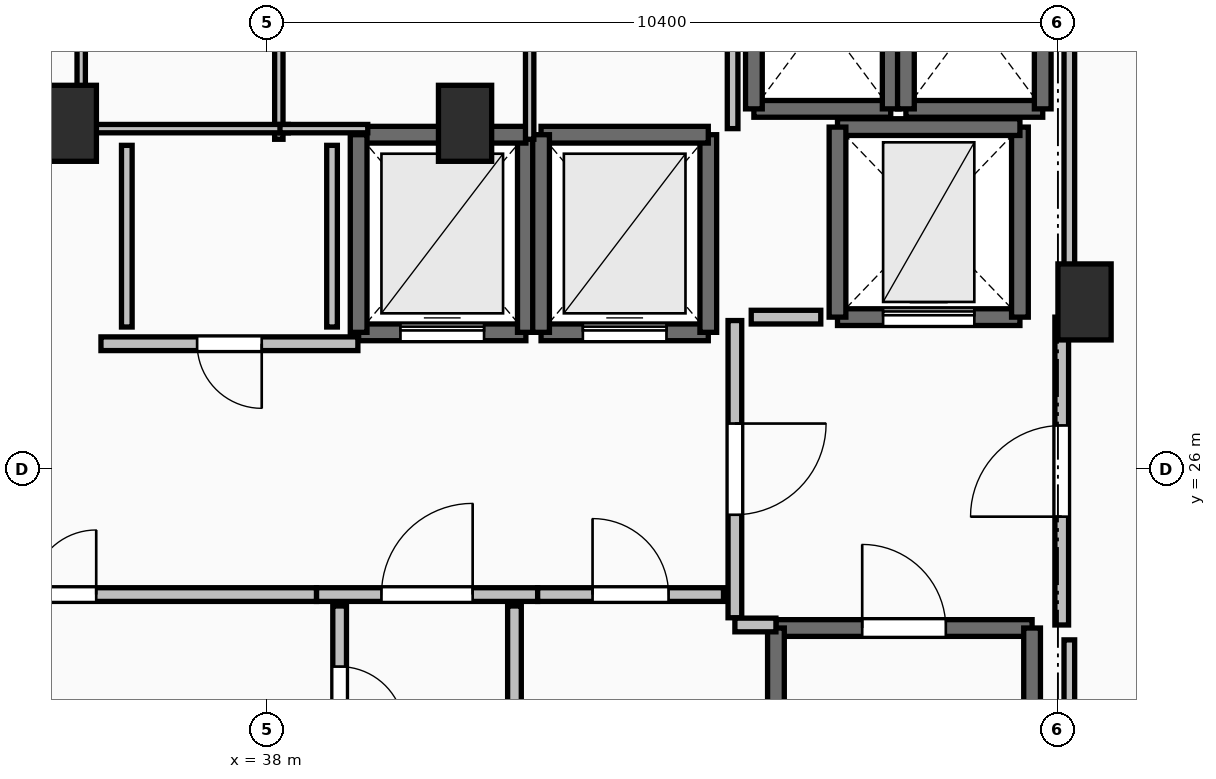
"""IFC4 building model, lengths in metres.
Left out: names, types, materials, properties, quantities, classifications, styles, units other than length and angle.
Written with IfcOpenShell. Run it as: python <this file> out.ifc"""

import sys

from ifc_helpers import new_model, si_unit, direction, frame, frame_2d, origin, origin_2d, place, context, subcontext, project, spatial, rectangle, extrude, element, fill, save


model = new_model("IFC4")
c1 = context("Model", 3, precision=1e-05, world=origin(), true_north=direction((0.0, 1.0)))
c2 = subcontext(c1, "Body", "Model", "MODEL_VIEW")
j1 = project(units=[si_unit("LENGTHUNIT", "METRE"), si_unit("PLANEANGLEUNIT", "RADIAN")], contexts=[c1])
p1 = place(None, origin())
s1 = spatial("IfcSite", under=j1, at=p1, CompositionType="ELEMENT")
p2 = place(p1, origin())
s2 = spatial("IfcBuilding", under=s1, at=p2, CompositionType="ELEMENT")
p3 = place(p2, frame((0.0, 0.0, 244.9)))
s3 = spatial("IfcBuildingStorey", under=s2, at=p3, CompositionType="ELEMENT", Elevation=244.9)
for number, where, z_axis, x_axis in (
    (1, (48.75, 28.2, 0.0), (0.0, 0.0, 1.0), (1.0, 0.0, 0.0)),
    (2, (35.4, 30.55, 0.0), (0.0, 0.0, 1.0), (1.0, 0.0, 0.0)),
    (3, (40.6, 30.55, 0.0), (0.0, 0.0, 1.0), (1.0, 0.0, 0.0)),
):
    element("IfcColumn", number, at=place(p3, frame(where, z_axis=z_axis, x_axis=x_axis)), inside=s3, PredefinedType="PILASTER", context=c2, shape_type="SweptSolid", body=[
        extrude(rectangle(XDim=0.7, YDim=1.0, at=origin_2d()), origin(), (0.0, 0.0, 1.0), 3.55),
    ])
p4 = place(p3, frame((44.69, 23.91, 0.0), z_axis=(0.0, 0.0, 1.0), x_axis=(1.0, 0.0, 0.0)))
e4 = element("IfcWall", 4, at=p4, inside=s3, PredefinedType="SOLIDWALL", context=c2, shape_type="SweptSolid", body=[
    extrude(rectangle(XDim=3.37, YDim=0.22, at=frame_2d((1.685, 0.0))), origin(), (0.0, 0.0, 1.0), 3.29),
])
p5 = place(p4, frame((1.135, 0.0, 0.0)))
e5 = element("IfcOpeningElement", 5, at=p5, cuts=e4, PredefinedType="OPENING", context=c2, shape_type="SweptSolid", body=[
    extrude(rectangle(XDim=1.1, YDim=2.15, at=frame_2d((0.55, 1.075))), frame((0.0, 0.125, 0.0), z_axis=(0.0, -1.0, 0.0), x_axis=(1.0, 0.0, 0.0)), (0.0, 0.0, 1.0), 0.25),
])
for number, where, z_axis, x_axis in (
    (6, (48.06, 23.91, 0.0), (0.0, 0.0, 1.0), (0.0, -1.0, 0.0)),
    (7, (44.69, 16.49, 0.0), (0.0, 0.0, 1.0), (0.0, 1.0, 0.0)),
):
    element("IfcWall", number, at=place(p3, frame(where, z_axis=z_axis, x_axis=x_axis)), inside=s3, PredefinedType="SOLIDWALL", context=c2, shape_type="SweptSolid", body=[
        extrude(rectangle(XDim=7.42, YDim=0.22, at=frame_2d((3.71, 0.0))), origin(), (0.0, 0.0, 1.0), 3.29),
    ])
p6 = place(p3, frame((39.2, 27.8, 0.0), z_axis=(0.0, 0.0, 1.0), x_axis=(1.0, 0.0, 0.0)))
e8 = element("IfcWall", 8, at=p6, inside=s3, PredefinedType="SOLIDWALL", context=c2, shape_type="SweptSolid", body=[
    extrude(rectangle(XDim=2.2, YDim=0.22, at=frame_2d((1.1, 0.0))), origin(), (0.0, 0.0, 1.0), 3.29),
])
p7 = place(p6, frame((0.55, 0.0, 0.0)))
e9 = element("IfcOpeningElement", 9, at=p7, cuts=e8, PredefinedType="OPENING", context=c2, shape_type="SweptSolid", body=[
    extrude(rectangle(XDim=1.1, YDim=2.2, at=frame_2d((0.55, 1.1))), frame((0.0, 0.125, 0.0), z_axis=(0.0, -1.0, 0.0), x_axis=(1.0, 0.0, 0.0)), (0.0, 0.0, 1.0), 0.25),
])
p8 = place(p3, frame((41.4, 27.8, 0.0), z_axis=(0.0, 0.0, 1.0), x_axis=(0.0, 1.0, 0.0)))
e10 = element("IfcWall", 10, at=p8, inside=s3, PredefinedType="SOLIDWALL", context=c2, shape_type="SweptSolid", body=[
    extrude(rectangle(XDim=2.6, YDim=0.22, at=frame_2d((1.3, 0.0))), origin(), (0.0, 0.0, 1.0), 3.29),
])
p9 = place(p3, frame((41.4, 30.4, 0.0), z_axis=(0.0, 0.0, 1.0), x_axis=(-1.0, 0.0, 0.0)))
e11 = element("IfcWall", 11, at=p9, inside=s3, PredefinedType="SOLIDWALL", context=c2, shape_type="SweptSolid", body=[
    extrude(rectangle(XDim=2.2, YDim=0.22, at=frame_2d((1.1, 0.0))), origin(), (0.0, 0.0, 1.0), 3.29),
])
p10 = place(p3, frame((39.2, 30.4, 0.0), z_axis=(0.0, 0.0, 1.0), x_axis=(0.0, -1.0, 0.0)))
e12 = element("IfcWall", 12, at=p10, inside=s3, PredefinedType="SOLIDWALL", context=c2, shape_type="SweptSolid", body=[
    extrude(rectangle(XDim=2.6, YDim=0.22, at=frame_2d((1.3, 0.0))), origin(), (0.0, 0.0, 1.0), 3.29),
])
p11 = place(p3, frame((41.6, 27.8, 0.0), z_axis=(0.0, 0.0, 1.0), x_axis=(1.0, 0.0, 0.0)))
e13 = element("IfcWall", 13, at=p11, inside=s3, PredefinedType="SOLIDWALL", context=c2, shape_type="SweptSolid", body=[
    extrude(rectangle(XDim=2.2, YDim=0.22, at=frame_2d((1.1, 0.0))), origin(), (0.0, 0.0, 1.0), 3.29),
])
p12 = place(p11, frame((0.55, 0.0, 0.0)))
e14 = element("IfcOpeningElement", 14, at=p12, cuts=e13, PredefinedType="OPENING", context=c2, shape_type="SweptSolid", body=[
    extrude(rectangle(XDim=1.1, YDim=2.2, at=frame_2d((0.55, 1.1))), frame((0.0, 0.125, 0.0), z_axis=(0.0, -1.0, 0.0), x_axis=(1.0, 0.0, 0.0)), (0.0, 0.0, 1.0), 0.25),
])
p13 = place(p3, frame((43.8, 27.8, 0.0), z_axis=(0.0, 0.0, 1.0), x_axis=(0.0, 1.0, 0.0)))
e15 = element("IfcWall", 15, at=p13, inside=s3, PredefinedType="SOLIDWALL", context=c2, shape_type="SweptSolid", body=[
    extrude(rectangle(XDim=2.6, YDim=0.22, at=frame_2d((1.3, 0.0))), origin(), (0.0, 0.0, 1.0), 3.29),
])
p14 = place(p3, frame((43.8, 30.4, 0.0), z_axis=(0.0, 0.0, 1.0), x_axis=(-1.0, 0.0, 0.0)))
e16 = element("IfcWall", 16, at=p14, inside=s3, PredefinedType="SOLIDWALL", context=c2, shape_type="SweptSolid", body=[
    extrude(rectangle(XDim=2.2, YDim=0.22, at=frame_2d((1.1, 0.0))), origin(), (0.0, 0.0, 1.0), 3.29),
])
p15 = place(p3, frame((41.6, 30.4, 0.0), z_axis=(0.0, 0.0, 1.0), x_axis=(0.0, -1.0, 0.0)))
e17 = element("IfcWall", 17, at=p15, inside=s3, PredefinedType="SOLIDWALL", context=c2, shape_type="SweptSolid", body=[
    extrude(rectangle(XDim=2.6, YDim=0.22, at=frame_2d((1.3, 0.0))), origin(), (0.0, 0.0, 1.0), 3.29),
])
p16 = place(p3, frame((44.4, 30.74, 0.0), z_axis=(0.0, 0.0, 1.0), x_axis=(1.0, 0.0, 0.0)))
e18 = element("IfcWall", 18, at=p16, inside=s3, PredefinedType="SOLIDWALL", context=c2, shape_type="SweptSolid", body=[
    extrude(rectangle(XDim=1.8, YDim=0.22, at=frame_2d((0.9, 0.0))), origin(), (0.0, 0.0, 1.0), 3.29),
])
for number, where, z_axis, x_axis in (
    (19, (46.2, 30.74, 0.0), (0.0, 0.0, 1.0), (0.0, 1.0, 0.0)),
    (20, (44.4, 33.16, 0.0), (0.0, 0.0, 1.0), (0.0, -1.0, 0.0)),
):
    element("IfcWall", number, at=place(p3, frame(where, z_axis=z_axis, x_axis=x_axis)), inside=s3, PredefinedType="SOLIDWALL", context=c2, shape_type="SweptSolid", body=[
        extrude(rectangle(XDim=2.42, YDim=0.22, at=frame_2d((1.21, 0.0))), origin(), (0.0, 0.0, 1.0), 3.29),
    ])
p17 = place(p3, frame((46.4, 30.74, 0.0), z_axis=(0.0, 0.0, 1.0), x_axis=(1.0, 0.0, 0.0)))
e21 = element("IfcWall", 21, at=p17, inside=s3, PredefinedType="SOLIDWALL", context=c2, shape_type="SweptSolid", body=[
    extrude(rectangle(XDim=1.8, YDim=0.22, at=frame_2d((0.9, 0.0))), origin(), (0.0, 0.0, 1.0), 3.29),
])
for number, where, z_axis, x_axis in (
    (22, (48.2, 30.74, 0.0), (0.0, 0.0, 1.0), (0.0, 1.0, 0.0)),
    (23, (46.4, 33.16, 0.0), (0.0, 0.0, 1.0), (0.0, -1.0, 0.0)),
):
    element("IfcWall", number, at=place(p3, frame(where, z_axis=z_axis, x_axis=x_axis)), inside=s3, PredefinedType="SOLIDWALL", context=c2, shape_type="SweptSolid", body=[
        extrude(rectangle(XDim=2.42, YDim=0.22, at=frame_2d((1.21, 0.0))), origin(), (0.0, 0.0, 1.0), 3.29),
    ])
p18 = place(p3, frame((45.5, 28.0, 0.0), z_axis=(0.0, 0.0, 1.0), x_axis=(1.0, 0.0, 0.0)))
e24 = element("IfcWall", 24, at=p18, inside=s3, PredefinedType="SHEAR", context=c2, shape_type="SweptSolid", body=[
    extrude(rectangle(XDim=2.4, YDim=0.22, at=frame_2d((1.2, 0.0))), origin(), (0.0, 0.0, 1.0), 3.29),
])
p19 = place(p18, frame((0.6, 0.0, 0.0)))
e25 = element("IfcOpeningElement", 25, at=p19, cuts=e24, PredefinedType="OPENING", context=c2, shape_type="SweptSolid", body=[
    extrude(rectangle(XDim=1.2, YDim=2.2, at=frame_2d((0.6, 1.1))), frame((0.0, 0.125, 0.0), z_axis=(0.0, -1.0, 0.0), x_axis=(1.0, 0.0, 0.0)), (0.0, 0.0, 1.0), 0.25),
])
p20 = place(p3, frame((47.9, 28.0, 0.0), z_axis=(0.0, 0.0, 1.0), x_axis=(0.0, 1.0, 0.0)))
e26 = element("IfcWall", 26, at=p20, inside=s3, PredefinedType="SHEAR", context=c2, shape_type="SweptSolid", body=[
    extrude(rectangle(XDim=2.5, YDim=0.22, at=frame_2d((1.25, 0.0))), origin(), (0.0, 0.0, 1.0), 3.29),
])
p21 = place(p3, frame((47.9, 30.5, 0.0), z_axis=(0.0, 0.0, 1.0), x_axis=(-1.0, 0.0, 0.0)))
e27 = element("IfcWall", 27, at=p21, inside=s3, PredefinedType="SHEAR", context=c2, shape_type="SweptSolid", body=[
    extrude(rectangle(XDim=2.4, YDim=0.22, at=frame_2d((1.2, 0.0))), origin(), (0.0, 0.0, 1.0), 3.29),
])
p22 = place(p3, frame((45.5, 30.5, 0.0), z_axis=(0.0, 0.0, 1.0), x_axis=(0.0, -1.0, 0.0)))
e28 = element("IfcWall", 28, at=p22, inside=s3, PredefinedType="SHEAR", context=c2, shape_type="SweptSolid", body=[
    extrude(rectangle(XDim=2.5, YDim=0.22, at=frame_2d((1.25, 0.0))), origin(), (0.0, 0.0, 1.0), 3.29),
])
p23 = place(p3, frame((44.15, 27.955, 0.0), z_axis=(0.0, 0.0, 1.0), x_axis=(0.0, -1.0, 0.0)))
e29 = element("IfcWall", 29, at=p23, inside=s3, PredefinedType="PARTITIONING", context=c2, shape_type="SweptSolid", body=[
    extrude(rectangle(XDim=3.91, YDim=0.18, at=frame_2d((1.955, 0.0))), origin(), (0.0, 0.0, 1.0), 3.29),
])
p24 = place(p23, frame((1.355, 0.0, 0.0)))
e30 = element("IfcOpeningElement", 30, at=p24, cuts=e29, PredefinedType="OPENING", context=c2, shape_type="SweptSolid", body=[
    extrude(rectangle(XDim=1.2, YDim=2.15, at=frame_2d((0.6, 1.075))), frame((0.0, 0.105, 0.0), z_axis=(0.0, -1.0, 0.0), x_axis=(1.0, 0.0, 0.0)), (0.0, 0.0, 1.0), 0.21),
])
p25 = place(p3, frame((44.15, 23.95, 0.0), z_axis=(0.0, 0.0, 1.0), x_axis=(1.0, 0.0, 0.0)))
e31 = element("IfcWall", 31, at=p25, inside=s3, PredefinedType="PARTITIONING", context=c2, shape_type="SweptSolid", body=[
    extrude(rectangle(XDim=0.54, YDim=0.18, at=frame_2d((0.27, 0.0))), origin(), (0.0, 0.0, 1.0), 3.29),
])
p26 = place(p3, frame((48.45, 23.95, 0.0), z_axis=(0.0, 0.0, 1.0), x_axis=(0.0, 1.0, 0.0)))
e32 = element("IfcWall", 32, at=p26, inside=s3, PredefinedType="PARTITIONING", context=c2, shape_type="SweptSolid", body=[
    extrude(rectangle(XDim=4.05, YDim=0.18, at=frame_2d((2.025, 0.0))), origin(), (0.0, 0.0, 1.0), 3.29),
])
p27 = place(p26, frame((1.425, 0.0, 0.0)))
e33 = element("IfcOpeningElement", 33, at=p27, cuts=e32, PredefinedType="OPENING", context=c2, shape_type="SweptSolid", body=[
    extrude(rectangle(XDim=1.2, YDim=2.15, at=frame_2d((0.6, 1.075))), frame((0.0, 0.105, 0.0), z_axis=(0.0, -1.0, 0.0), x_axis=(1.0, 0.0, 0.0)), (0.0, 0.0, 1.0), 0.21),
])
p28 = place(p3, frame((38.645, 24.35, 0.0), z_axis=(0.0, 0.0, 1.0), x_axis=(1.0, 0.0, 0.0)))
e34 = element("IfcWall", 34, at=p28, inside=s3, PredefinedType="PARTITIONING", context=c2, shape_type="SweptSolid", body=[
    extrude(rectangle(XDim=2.91, YDim=0.18, at=frame_2d((1.455, 0.0))), origin(), (0.0, 0.0, 1.0), 3.29),
])
p29 = place(p28, frame((0.855, 0.0, 0.0)))
e35 = element("IfcOpeningElement", 35, at=p29, cuts=e34, PredefinedType="OPENING", context=c2, shape_type="SweptSolid", body=[
    extrude(rectangle(XDim=1.2, YDim=2.15, at=frame_2d((0.6, 1.075))), frame((0.0, 0.105, 0.0), z_axis=(0.0, -1.0, 0.0), x_axis=(1.0, 0.0, 0.0)), (0.0, 0.0, 1.0), 0.21),
])
p30 = place(p3, frame((41.555, 24.35, 0.0), z_axis=(0.0, 0.0, 1.0), x_axis=(1.0, 0.0, 0.0)))
e36 = element("IfcWall", 36, at=p30, inside=s3, PredefinedType="PARTITIONING", context=c2, shape_type="SweptSolid", body=[
    extrude(rectangle(XDim=2.445, YDim=0.18, at=frame_2d((1.223, 0.0))), origin(), (0.0, 0.0, 1.0), 3.29),
])
p31 = place(p30, frame((0.722, 0.0, 0.0)))
e37 = element("IfcOpeningElement", 37, at=p31, cuts=e36, PredefinedType="OPENING", context=c2, shape_type="SweptSolid", body=[
    extrude(rectangle(XDim=1.0, YDim=2.15, at=frame_2d((0.5, 1.075))), frame((0.0, 0.105, 0.0), z_axis=(0.0, -1.0, 0.0), x_axis=(1.0, 0.0, 0.0)), (0.0, 0.0, 1.0), 0.21),
])
p32 = place(p3, frame((39.19, 27.65, 0.0), z_axis=(0.0, 0.0, 1.0), x_axis=(-1.0, 0.0, 0.0)))
e38 = element("IfcWall", 38, at=p32, inside=s3, PredefinedType="PARTITIONING", context=c2, shape_type="SweptSolid", body=[
    extrude(rectangle(XDim=3.38, YDim=0.18, at=frame_2d((1.69, 0.0))), origin(), (0.0, 0.0, 1.0), 3.29),
])
p33 = place(p32, frame((1.265, 0.0, 0.0)))
e39 = element("IfcOpeningElement", 39, at=p33, cuts=e38, PredefinedType="OPENING", context=c2, shape_type="SweptSolid", body=[
    extrude(rectangle(XDim=0.85, YDim=2.1, at=frame_2d((0.425, 1.05))), frame((0.0, 0.105, 0.0), z_axis=(0.0, -1.0, 0.0), x_axis=(1.0, 0.0, 0.0)), (0.0, 0.0, 1.0), 0.21),
])
p34 = place(p3, frame((32.0, 24.35, 0.0), z_axis=(0.0, 0.0, 1.0), x_axis=(1.0, 0.0, 0.0)))
e40 = element("IfcWall", 40, at=p34, inside=s3, PredefinedType="PARTITIONING", context=c2, shape_type="SweptSolid", body=[
    extrude(rectangle(XDim=6.645, YDim=0.18, at=frame_2d((3.323, 0.0))), origin(), (0.0, 0.0, 1.0), 3.29),
])
p35 = place(p34, frame((2.897, 0.0, 0.0)))
e41 = element("IfcOpeningElement", 41, at=p35, cuts=e40, PredefinedType="OPENING", context=c2, shape_type="SweptSolid", body=[
    extrude(rectangle(XDim=0.85, YDim=2.1, at=frame_2d((0.425, 1.05))), frame((0.0, 0.105, 0.0), z_axis=(0.0, -1.0, 0.0), x_axis=(1.0, 0.0, 0.0)), (0.0, 0.0, 1.0), 0.21),
])
p36 = place(p3, frame((41.25, 20.305, 0.0), z_axis=(0.0, 0.0, 1.0), x_axis=(0.0, 1.0, 0.0)))
e42 = element("IfcWall", 42, at=p36, inside=s3, PredefinedType="PARTITIONING", context=c2, shape_type="SweptSolid", body=[
    extrude(rectangle(XDim=3.895, YDim=0.18, at=frame_2d((1.948, 0.0))), origin(), (0.0, 0.0, 1.0), 2.482),
])
p37 = place(p36, frame((1.448, 0.0, 0.0)))
e43 = element("IfcOpeningElement", 43, at=p37, cuts=e42, PredefinedType="OPENING", context=c2, shape_type="SweptSolid", body=[
    extrude(rectangle(XDim=1.0, YDim=2.15, at=frame_2d((0.5, 1.075))), frame((0.0, 0.105, 0.0), z_axis=(0.0, -1.0, 0.0), x_axis=(1.0, 0.0, 0.0)), (0.0, 0.0, 1.0), 0.21),
])
p38 = place(p3, frame((38.95, 24.2, 0.0), z_axis=(0.0, 0.0, 1.0), x_axis=(0.0, -1.0, 0.0)))
e44 = element("IfcWall", 44, at=p38, inside=s3, PredefinedType="PARTITIONING", context=c2, shape_type="SweptSolid", body=[
    extrude(rectangle(XDim=2.445, YDim=0.18, at=frame_2d((1.223, 0.0))), origin(), (0.0, 0.0, 1.0), 2.482),
])
p39 = place(p38, frame((0.798, 0.0, 0.0)))
e45 = element("IfcOpeningElement", 45, at=p39, cuts=e44, PredefinedType="OPENING", context=c2, shape_type="SweptSolid", body=[
    extrude(rectangle(XDim=0.85, YDim=2.1, at=frame_2d((0.425, 1.05))), frame((0.0, 0.105, 0.0), z_axis=(0.0, -1.0, 0.0), x_axis=(1.0, 0.0, 0.0)), (0.0, 0.0, 1.0), 0.21),
])
for number, where, z_axis, x_axis in (
    (46, (35.55, 30.34, 0.0), (0.0, 0.0, 1.0), (0.0, 1.0, 0.0)),
    (47, (38.15, 30.34, 0.0), (0.0, 0.0, 1.0), (0.0, 1.0, 0.0)),
):
    element("IfcWall", number, at=place(p3, frame(where, z_axis=z_axis, x_axis=x_axis)), inside=s3, PredefinedType="PARTITIONING", context=c2, shape_type="SweptSolid", body=[
        extrude(rectangle(XDim=3.56, YDim=0.11, at=frame_2d((1.78, 0.0))), origin(), (0.0, 0.0, 1.0), 2.482),
    ])
p40 = place(p3, frame((35.68, 30.48, 0.0), z_axis=(0.0, 0.0, 1.0), x_axis=(1.0, 0.0, 0.0)))
e48 = element("IfcWall", 48, at=p40, inside=s3, PredefinedType="PARTITIONING", context=c2, shape_type="SweptSolid", body=[
    extrude(rectangle(XDim=2.595, YDim=0.11, at=frame_2d((1.297, 0.0))), origin(), (0.0, 0.0, 1.0), 2.482),
])
p41 = place(p3, frame((41.45, 30.34, 0.0), z_axis=(0.0, 0.0, 1.0), x_axis=(0.0, 1.0, 0.0)))
e49 = element("IfcWall", 49, at=p41, inside=s3, PredefinedType="PARTITIONING", context=c2, shape_type="SweptSolid", body=[
    extrude(rectangle(XDim=3.56, YDim=0.11, at=frame_2d((1.78, 0.0))), origin(), (0.0, 0.0, 1.0), 3.29),
])
p42 = place(p3, frame((38.165, 30.48, 0.0), z_axis=(0.0, 0.0, 1.0), x_axis=(1.0, 0.0, 0.0)))
e50 = element("IfcWall", 50, at=p42, inside=s3, PredefinedType="PARTITIONING", context=c2, shape_type="SweptSolid", body=[
    extrude(rectangle(XDim=1.155, YDim=0.11, at=frame_2d((0.578, 0.0))), origin(), (0.0, 0.0, 1.0), 2.482),
])
p43 = place(p3, frame((45.28, 28.0, 0.0), z_axis=(0.0, 0.0, 1.0), x_axis=(-1.0, 0.0, 0.0)))
e51 = element("IfcWall", 51, at=p43, inside=s3, PredefinedType="PARTITIONING", context=c2, shape_type="SweptSolid", body=[
    extrude(rectangle(XDim=0.915, YDim=0.18, at=frame_2d((0.458, 0.0))), origin(), (0.0, 0.0, 1.0), 3.29),
])
p44 = place(p3, frame((44.12, 30.48, 0.0), z_axis=(0.0, 0.0, 1.0), x_axis=(0.0, 1.0, 0.0)))
e52 = element("IfcWall", 52, at=p44, inside=s3, PredefinedType="PARTITIONING", context=c2, shape_type="SweptSolid", body=[
    extrude(rectangle(XDim=2.41, YDim=0.14, at=frame_2d((1.205, 0.0))), origin(), (0.0, 0.0, 1.0), 3.29),
])
for number, where, z_axis, x_axis in (
    (53, (36.15, 30.26, 0.0), (0.0, 0.0, 1.0), (0.0, -1.0, 0.0)),
    (54, (38.85, 27.87, 0.0), (0.0, 0.0, 1.0), (0.0, 1.0, 0.0)),
):
    element("IfcWall", number, at=place(p3, frame(where, z_axis=z_axis, x_axis=x_axis)), inside=s3, PredefinedType="PARTITIONING", context=c2, shape_type="SweptSolid", body=[
        extrude(rectangle(XDim=2.39, YDim=0.14, at=frame_2d((1.195, 0.0))), origin(), (0.0, 0.0, 1.0), 3.29),
    ])
p45 = place(p3, frame((48.55, 16.24, 0.0), z_axis=(0.0, 0.0, 1.0), x_axis=(0.0, 1.0, 0.0)))
e55 = element("IfcWall", 55, at=p45, inside=s3, PredefinedType="PARTITIONING", context=c2, shape_type="SweptSolid", body=[
    extrude(rectangle(XDim=7.514, YDim=0.14, at=frame_2d((3.757, 0.0))), origin(), (0.0, 0.0, 1.0), 2.482),
])
p46 = place(p3, frame((48.55, 28.196, 0.0), z_axis=(0.0, 0.0, 1.0), x_axis=(0.0, 1.0, 0.0)))
e56 = element("IfcWall", 56, at=p46, inside=s3, PredefinedType="PARTITIONING", context=c2, shape_type="SweptSolid", body=[
    extrude(rectangle(XDim=5.254, YDim=0.14, at=frame_2d((2.627, 0.0))), origin(), (0.0, 0.0, 1.0), 2.482),
])
p47 = place(p5, origin())
e57 = element("IfcDoor", 57, at=p47, inside=s3, OperationType="SINGLE_SWING_LEFT", PredefinedType="DOOR", context=c2, shape_type="SweptSolid", body=[
    extrude(rectangle(XDim=1.1, YDim=2.15, at=frame_2d((0.55, 1.075))), frame((0.0, 0.025, 0.0), z_axis=(0.0, -1.0, 0.0), x_axis=(1.0, 0.0, 0.0)), (0.0, 0.0, 1.0), 0.05),
])
fill(e5, e57)
p48 = place(p7, origin())
e58 = element("IfcDoor", 58, at=p48, inside=s3, OperationType="SLIDING_TO_LEFT", PredefinedType="DOOR", context=c2, shape_type="SweptSolid", body=[
    extrude(rectangle(XDim=1.1, YDim=2.2, at=frame_2d((0.55, 1.1))), frame((0.0, 0.025, 0.0), z_axis=(0.0, -1.0, 0.0), x_axis=(1.0, 0.0, 0.0)), (0.0, 0.0, 1.0), 0.05),
])
fill(e9, e58)
p49 = place(p12, origin())
e59 = element("IfcDoor", 59, at=p49, inside=s3, OperationType="SLIDING_TO_LEFT", PredefinedType="DOOR", context=c2, shape_type="SweptSolid", body=[
    extrude(rectangle(XDim=1.1, YDim=2.2, at=frame_2d((0.55, 1.1))), frame((0.0, 0.025, 0.0), z_axis=(0.0, -1.0, 0.0), x_axis=(1.0, 0.0, 0.0)), (0.0, 0.0, 1.0), 0.05),
])
fill(e14, e59)
p50 = place(p19, origin())
e60 = element("IfcDoor", 60, at=p50, inside=s3, OperationType="SLIDING_TO_LEFT", PredefinedType="DOOR", context=c2, shape_type="SweptSolid", body=[
    extrude(rectangle(XDim=1.2, YDim=2.2, at=frame_2d((0.6, 1.1))), frame((0.0, 0.025, 0.0), z_axis=(0.0, -1.0, 0.0), x_axis=(1.0, 0.0, 0.0)), (0.0, 0.0, 1.0), 0.05),
])
fill(e25, e60)
p51 = place(p24, origin())
e61 = element("IfcDoor", 61, at=p51, inside=s3, OperationType="SINGLE_SWING_LEFT", PredefinedType="DOOR", context=c2, shape_type="SweptSolid", body=[
    extrude(rectangle(XDim=1.2, YDim=2.15, at=frame_2d((0.6, 1.075))), frame((0.0, 0.025, 0.0), z_axis=(0.0, -1.0, 0.0), x_axis=(1.0, 0.0, 0.0)), (0.0, 0.0, 1.0), 0.05),
])
fill(e30, e61)
p52 = place(p27, origin())
e62 = element("IfcDoor", 62, at=p52, inside=s3, OperationType="SINGLE_SWING_LEFT", PredefinedType="DOOR", context=c2, shape_type="SweptSolid", body=[
    extrude(rectangle(XDim=1.2, YDim=2.15, at=frame_2d((0.6, 1.075))), frame((0.0, 0.025, 0.0), z_axis=(0.0, -1.0, 0.0), x_axis=(1.0, 0.0, 0.0)), (0.0, 0.0, 1.0), 0.05),
])
fill(e33, e62)
p53 = place(p29, origin())
e63 = element("IfcDoor", 63, at=p53, inside=s3, OperationType="SINGLE_SWING_RIGHT", PredefinedType="DOOR", context=c2, shape_type="SweptSolid", body=[
    extrude(rectangle(XDim=1.2, YDim=2.15, at=frame_2d((0.6, 1.075))), frame((0.0, 0.025, 0.0), z_axis=(0.0, -1.0, 0.0), x_axis=(1.0, 0.0, 0.0)), (0.0, 0.0, 1.0), 0.05),
])
fill(e35, e63)
p54 = place(p31, origin())
e64 = element("IfcDoor", 64, at=p54, inside=s3, OperationType="SINGLE_SWING_LEFT", PredefinedType="DOOR", context=c2, shape_type="SweptSolid", body=[
    extrude(rectangle(XDim=1.0, YDim=2.15, at=frame_2d((0.5, 1.075))), frame((0.0, 0.025, 0.0), z_axis=(0.0, -1.0, 0.0), x_axis=(1.0, 0.0, 0.0)), (0.0, 0.0, 1.0), 0.05),
])
fill(e37, e64)
p55 = place(p33, origin())
e65 = element("IfcDoor", 65, at=p55, inside=s3, OperationType="SINGLE_SWING_LEFT", PredefinedType="DOOR", context=c2, shape_type="SweptSolid", body=[
    extrude(rectangle(XDim=0.85, YDim=2.1, at=frame_2d((0.425, 1.05))), frame((0.0, 0.025, 0.0), z_axis=(0.0, -1.0, 0.0), x_axis=(1.0, 0.0, 0.0)), (0.0, 0.0, 1.0), 0.05),
])
fill(e39, e65)
p56 = place(p35, origin())
e66 = element("IfcDoor", 66, at=p56, inside=s3, OperationType="SINGLE_SWING_RIGHT", PredefinedType="DOOR", context=c2, shape_type="SweptSolid", body=[
    extrude(rectangle(XDim=0.85, YDim=2.1, at=frame_2d((0.425, 1.05))), frame((0.0, 0.025, 0.0), z_axis=(0.0, -1.0, 0.0), x_axis=(1.0, 0.0, 0.0)), (0.0, 0.0, 1.0), 0.05),
])
fill(e41, e66)
p57 = place(p39, origin())
e67 = element("IfcDoor", 67, at=p57, inside=s3, OperationType="SINGLE_SWING_RIGHT", PredefinedType="DOOR", context=c2, shape_type="SweptSolid", body=[
    extrude(rectangle(XDim=0.85, YDim=2.1, at=frame_2d((0.425, 1.05))), frame((0.0, 0.025, 0.0), z_axis=(0.0, -1.0, 0.0), x_axis=(1.0, 0.0, 0.0)), (0.0, 0.0, 1.0), 0.05),
])
fill(e45, e67)
save(model, sys.argv[1])
